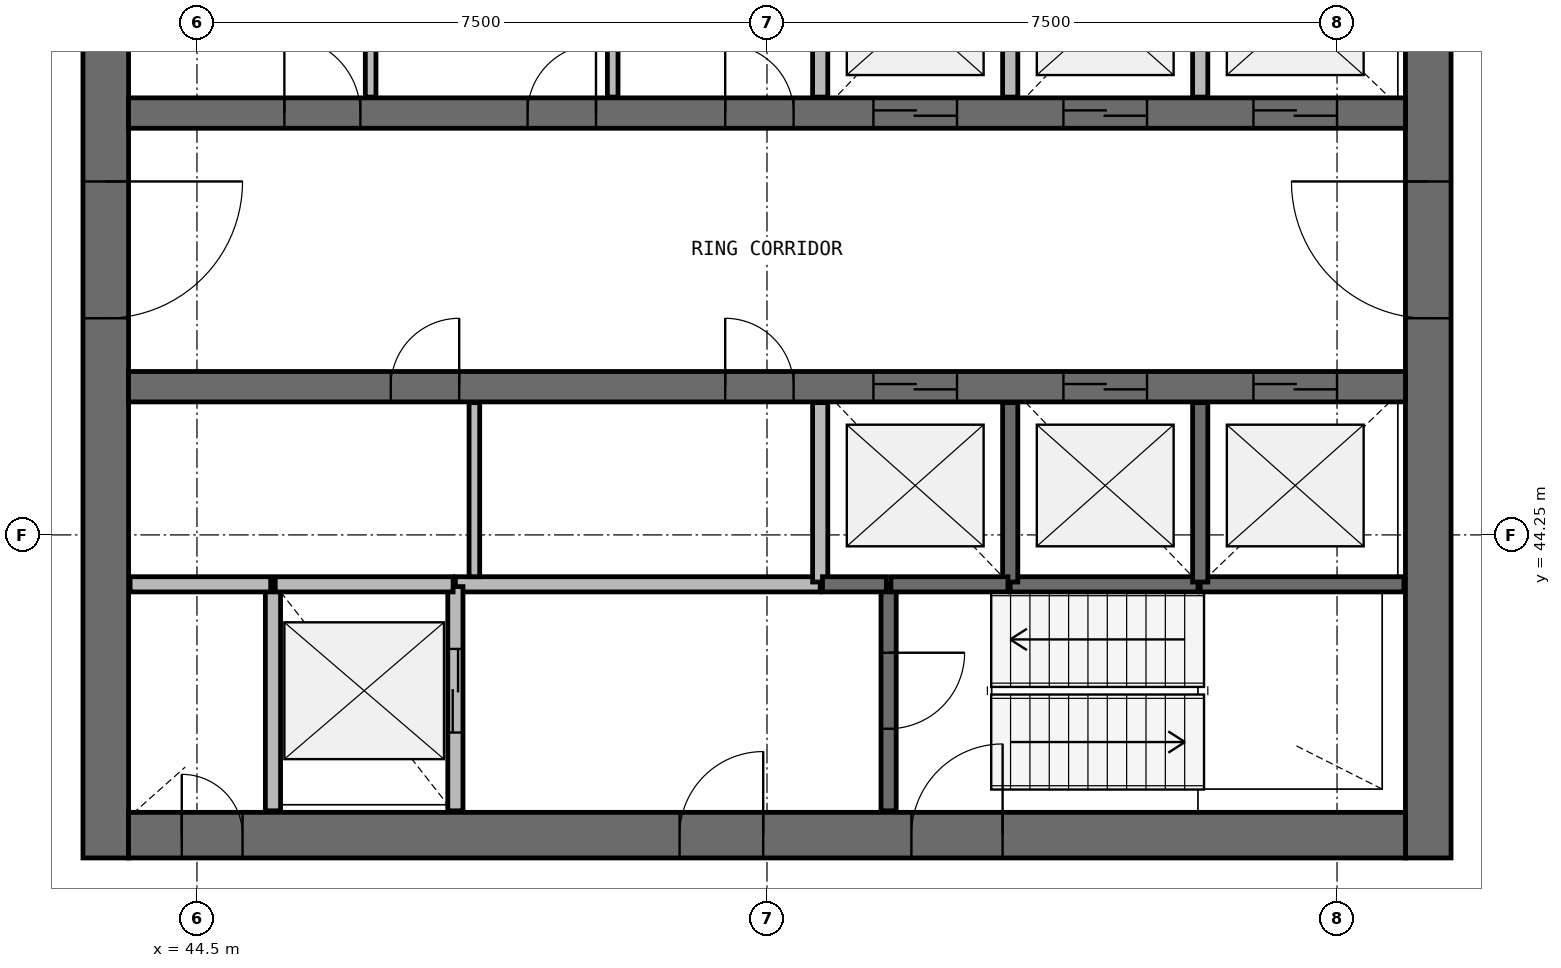
"""IFC4 building model, lengths in metres.
Left out: names, types, materials, properties, quantities, classifications, styles, units other than length and angle.
Written with IfcOpenShell. Run it as: python <this file> out.ifc"""

import sys

from ifc_helpers import new_model, si_unit, direction, frame, frame_2d, origin, place, context, subcontext, project, spatial, rectangle, extrude, source, transform, mapped, element, fill, save


model = new_model("IFC4")
c1 = context("Model", 3, precision=1e-05, world=origin(), true_north=direction((0.0, 1.0)))
c2 = subcontext(c1, "Body", "Model", "MODEL_VIEW")
j1 = project(units=[si_unit("LENGTHUNIT", "METRE"), si_unit("PLANEANGLEUNIT", "RADIAN")], contexts=[c1])
p1 = place(None, origin())
s1 = spatial("IfcSite", under=j1, at=p1, CompositionType="ELEMENT")
p2 = place(p1, origin())
s2 = spatial("IfcBuilding", under=s1, at=p2, CompositionType="ELEMENT")
p3 = place(p2, frame((0.0, 0.0, 238.4)))
s3 = spatial("IfcBuildingStorey", under=s2, at=p3, CompositionType="ELEMENT", Elevation=238.4)
p4 = place(p3, frame((60.7, 40.0, 0.0), z_axis=(0.0, 0.0, 1.0), x_axis=(0.0, 1.0, 0.0)))
e1 = element("IfcWall", 1, at=p4, inside=s3, PredefinedType="SHEAR", context=c2, shape_type="SweptSolid", body=[
    extrude(rectangle(XDim=16.0, YDim=0.6, at=frame_2d((8.0, 0.0))), origin(), (0.0, 0.0, 1.0), 3.9),
])
p5 = place(p4, frame((7.1, 0.0, 0.0)))
e2 = element("IfcOpeningElement", 2, at=p5, cuts=e1, PredefinedType="OPENING", context=c2, shape_type="SweptSolid", body=[
    extrude(rectangle(XDim=1.8, YDim=2.1, at=frame_2d((0.9, 1.05))), frame((0.0, 0.31, 0.0), z_axis=(0.0, -1.0, 0.0), x_axis=(1.0, 0.0, 0.0)), (0.0, 0.0, 1.0), 0.62),
])
p6 = place(p3, frame((43.3, 56.0, 0.0), z_axis=(0.0, 0.0, 1.0), x_axis=(0.0, -1.0, 0.0)))
e3 = element("IfcWall", 3, at=p6, inside=s3, PredefinedType="SHEAR", context=c2, shape_type="SweptSolid", body=[
    extrude(rectangle(XDim=16.0, YDim=0.6, at=frame_2d((8.0, 0.0))), origin(), (0.0, 0.0, 1.0), 3.9),
])
p7 = place(p6, frame((7.1, 0.0, 0.0)))
e4 = element("IfcOpeningElement", 4, at=p7, cuts=e3, PredefinedType="OPENING", context=c2, shape_type="SweptSolid", body=[
    extrude(rectangle(XDim=1.8, YDim=2.1, at=frame_2d((0.9, 1.05))), frame((0.0, 0.31, 0.0), z_axis=(0.0, -1.0, 0.0), x_axis=(1.0, 0.0, 0.0)), (0.0, 0.0, 1.0), 0.62),
])
p8 = place(p3, frame((43.6, 40.3, 0.0), z_axis=(0.0, 0.0, 1.0), x_axis=(1.0, 0.0, 0.0)))
e5 = element("IfcWall", 5, at=p8, inside=s3, PredefinedType="SHEAR", context=c2, shape_type="SweptSolid", body=[
    extrude(rectangle(XDim=16.8, YDim=0.6, at=frame_2d((8.4, 0.0))), origin(), (0.0, 0.0, 1.0), 3.9),
])
p9 = place(p8, frame((10.3, 0.0, 0.0)))
e6 = element("IfcOpeningElement", 6, at=p9, cuts=e5, PredefinedType="OPENING", context=c2, shape_type="SweptSolid", body=[
    extrude(rectangle(XDim=1.2, YDim=2.1, at=frame_2d((0.6, 1.05))), frame((0.0, 0.31, 0.0), z_axis=(0.0, -1.0, 0.0), x_axis=(1.0, 0.0, 0.0)), (0.0, 0.0, 1.0), 0.62),
])
p10 = place(p8, frame((7.25, 0.0, 0.0)))
e7 = element("IfcOpeningElement", 7, at=p10, cuts=e5, PredefinedType="OPENING", context=c2, shape_type="SweptSolid", body=[
    extrude(rectangle(XDim=1.1, YDim=2.1, at=frame_2d((0.55, 1.05))), frame((0.0, 0.31, 0.0), z_axis=(0.0, -1.0, 0.0), x_axis=(1.0, 0.0, 0.0)), (0.0, 0.0, 1.0), 0.62),
])
p11 = place(p8, frame((0.7, 0.0, 0.0)))
e8 = element("IfcOpeningElement", 8, at=p11, cuts=e5, PredefinedType="OPENING", context=c2, shape_type="SweptSolid", body=[
    extrude(rectangle(XDim=0.8, YDim=2.1, at=frame_2d((0.4, 1.05))), frame((0.0, 0.31, 0.0), z_axis=(0.0, -1.0, 0.0), x_axis=(1.0, 0.0, 0.0)), (0.0, 0.0, 1.0), 0.62),
])
p12 = place(p3, frame((43.6, 49.8, 0.0), z_axis=(0.0, 0.0, 1.0), x_axis=(1.0, 0.0, 0.0)))
e9 = element("IfcWall", 9, at=p12, inside=s3, PredefinedType="SHEAR", context=c2, shape_type="SweptSolid", body=[
    extrude(rectangle(XDim=16.8, YDim=0.4, at=frame_2d((8.4, 0.0))), origin(), (0.0, 0.0, 1.0), 3.9),
])
p13 = place(p12, frame((9.8, 0.0, 0.0)))
e10 = element("IfcOpeningElement", 10, at=p13, cuts=e9, PredefinedType="OPENING", context=c2, shape_type="SweptSolid", body=[
    extrude(rectangle(XDim=1.1, YDim=2.1, at=frame_2d((0.55, 1.05))), frame((0.0, 0.21, 0.0), z_axis=(0.0, -1.0, 0.0), x_axis=(1.0, 0.0, 0.0)), (0.0, 0.0, 1.0), 0.42),
])
p14 = place(p12, frame((12.3, 0.0, 0.0)))
e11 = element("IfcOpeningElement", 11, at=p14, cuts=e9, PredefinedType="OPENING", context=c2, shape_type="SweptSolid", body=[
    extrude(rectangle(XDim=1.1, YDim=2.1, at=frame_2d((0.55, 1.05))), frame((0.0, 0.21, 0.0), z_axis=(0.0, -1.0, 0.0), x_axis=(1.0, 0.0, 0.0)), (0.0, 0.0, 1.0), 0.42),
])
p15 = place(p12, frame((14.8, 0.0, 0.0)))
e12 = element("IfcOpeningElement", 12, at=p15, cuts=e9, PredefinedType="OPENING", context=c2, shape_type="SweptSolid", body=[
    extrude(rectangle(XDim=1.1, YDim=2.1, at=frame_2d((0.55, 1.05))), frame((0.0, 0.21, 0.0), z_axis=(0.0, -1.0, 0.0), x_axis=(1.0, 0.0, 0.0)), (0.0, 0.0, 1.0), 0.42),
])
p16 = place(p12, frame((2.05, 0.0, 0.0)))
e13 = element("IfcOpeningElement", 13, at=p16, cuts=e9, PredefinedType="OPENING", context=c2, shape_type="SweptSolid", body=[
    extrude(rectangle(XDim=1.0, YDim=2.1, at=frame_2d((0.5, 1.05))), frame((0.0, 0.21, 0.0), z_axis=(0.0, -1.0, 0.0), x_axis=(1.0, 0.0, 0.0)), (0.0, 0.0, 1.0), 0.42),
])
p17 = place(p12, frame((5.25, 0.0, 0.0)))
e14 = element("IfcOpeningElement", 14, at=p17, cuts=e9, PredefinedType="OPENING", context=c2, shape_type="SweptSolid", body=[
    extrude(rectangle(XDim=0.9, YDim=2.1, at=frame_2d((0.45, 1.05))), frame((0.0, 0.21, 0.0), z_axis=(0.0, -1.0, 0.0), x_axis=(1.0, 0.0, 0.0)), (0.0, 0.0, 1.0), 0.42),
])
p18 = place(p12, frame((7.85, 0.0, 0.0)))
e15 = element("IfcOpeningElement", 15, at=p18, cuts=e9, PredefinedType="OPENING", context=c2, shape_type="SweptSolid", body=[
    extrude(rectangle(XDim=0.9, YDim=2.1, at=frame_2d((0.45, 1.05))), frame((0.0, 0.21, 0.0), z_axis=(0.0, -1.0, 0.0), x_axis=(1.0, 0.0, 0.0)), (0.0, 0.0, 1.0), 0.42),
])
p19 = place(p3, frame((43.6, 46.2, 0.0), z_axis=(0.0, 0.0, 1.0), x_axis=(1.0, 0.0, 0.0)))
e16 = element("IfcWall", 16, at=p19, inside=s3, PredefinedType="SHEAR", context=c2, shape_type="SweptSolid", body=[
    extrude(rectangle(XDim=16.8, YDim=0.4, at=frame_2d((8.4, 0.0))), origin(), (0.0, 0.0, 1.0), 3.9),
])
p20 = place(p19, frame((9.8, 0.0, 0.0)))
e17 = element("IfcOpeningElement", 17, at=p20, cuts=e16, PredefinedType="OPENING", context=c2, shape_type="SweptSolid", body=[
    extrude(rectangle(XDim=1.1, YDim=2.1, at=frame_2d((0.55, 1.05))), frame((0.0, 0.21, 0.0), z_axis=(0.0, -1.0, 0.0), x_axis=(1.0, 0.0, 0.0)), (0.0, 0.0, 1.0), 0.42),
])
p21 = place(p19, frame((12.3, 0.0, 0.0)))
e18 = element("IfcOpeningElement", 18, at=p21, cuts=e16, PredefinedType="OPENING", context=c2, shape_type="SweptSolid", body=[
    extrude(rectangle(XDim=1.1, YDim=2.1, at=frame_2d((0.55, 1.05))), frame((0.0, 0.21, 0.0), z_axis=(0.0, -1.0, 0.0), x_axis=(1.0, 0.0, 0.0)), (0.0, 0.0, 1.0), 0.42),
])
p22 = place(p19, frame((14.8, 0.0, 0.0)))
e19 = element("IfcOpeningElement", 19, at=p22, cuts=e16, PredefinedType="OPENING", context=c2, shape_type="SweptSolid", body=[
    extrude(rectangle(XDim=1.1, YDim=2.1, at=frame_2d((0.55, 1.05))), frame((0.0, 0.21, 0.0), z_axis=(0.0, -1.0, 0.0), x_axis=(1.0, 0.0, 0.0)), (0.0, 0.0, 1.0), 0.42),
])
p23 = place(p19, frame((3.45, 0.0, 0.0)))
e20 = element("IfcOpeningElement", 20, at=p23, cuts=e16, PredefinedType="OPENING", context=c2, shape_type="SweptSolid", body=[
    extrude(rectangle(XDim=0.9, YDim=2.1, at=frame_2d((0.45, 1.05))), frame((0.0, 0.21, 0.0), z_axis=(0.0, -1.0, 0.0), x_axis=(1.0, 0.0, 0.0)), (0.0, 0.0, 1.0), 0.42),
])
p24 = place(p19, frame((7.85, 0.0, 0.0)))
e21 = element("IfcOpeningElement", 21, at=p24, cuts=e16, PredefinedType="OPENING", context=c2, shape_type="SweptSolid", body=[
    extrude(rectangle(XDim=0.9, YDim=2.1, at=frame_2d((0.45, 1.05))), frame((0.0, 0.21, 0.0), z_axis=(0.0, -1.0, 0.0), x_axis=(1.0, 0.0, 0.0)), (0.0, 0.0, 1.0), 0.42),
])
p25 = place(p3, frame((52.7, 43.6, 0.0), z_axis=(0.0, 0.0, 1.0), x_axis=(-1.0, 0.0, 0.0)))
e22 = element("IfcWall", 22, at=p25, inside=s3, PredefinedType="SOLIDWALL", context=c2, shape_type="SweptSolid", body=[
    extrude(rectangle(XDim=4.8, YDim=0.2, at=frame_2d((2.4, 0.0))), origin(), (0.0, 0.0, 1.0), 3.58),
])
p26 = place(p3, frame((45.5, 43.6, 0.0), z_axis=(0.0, 0.0, 1.0), x_axis=(0.0, -1.0, 0.0)))
e23 = element("IfcWall", 23, at=p26, inside=s3, PredefinedType="SOLIDWALL", context=c2, shape_type="SweptSolid", body=[
    extrude(rectangle(XDim=2.98, YDim=0.2, at=frame_2d((1.49, 0.0))), origin(), (0.0, 0.0, 1.0), 3.58),
])
p27 = place(p3, frame((47.9, 40.62, 0.0), z_axis=(0.0, 0.0, 1.0), x_axis=(0.0, 1.0, 0.0)))
e24 = element("IfcWall", 24, at=p27, inside=s3, PredefinedType="SOLIDWALL", context=c2, shape_type="SweptSolid", body=[
    extrude(rectangle(XDim=2.95, YDim=0.2, at=frame_2d((1.475, 0.0))), origin(), (0.0, 0.0, 1.0), 3.58),
])
p28 = place(p27, frame((1.03, 0.0, 0.0)))
e25 = element("IfcOpeningElement", 25, at=p28, cuts=e24, PredefinedType="OPENING", context=c2, shape_type="SweptSolid", body=[
    extrude(rectangle(XDim=1.1, YDim=2.1, at=frame_2d((0.55, 1.05))), frame((0.0, 0.11, 0.0), z_axis=(0.0, -1.0, 0.0), x_axis=(1.0, 0.0, 0.0)), (0.0, 0.0, 1.0), 0.22),
])
p29 = place(p3, frame((53.6, 43.6, 0.0), z_axis=(0.0, 0.0, 1.0), x_axis=(0.0, -1.0, 0.0)))
e26 = element("IfcWall", 26, at=p29, inside=s3, PredefinedType="SOLIDWALL", context=c2, shape_type="SweptSolid", body=[
    extrude(rectangle(XDim=2.98, YDim=0.2, at=frame_2d((1.49, 0.0))), origin(), (0.0, 0.0, 1.0), 3.58),
])
p30 = place(p29, frame((0.9, 0.0, 0.0)))
e27 = element("IfcOpeningElement", 27, at=p30, cuts=e26, PredefinedType="OPENING", context=c2, shape_type="SweptSolid", body=[
    extrude(rectangle(XDim=1.0, YDim=2.1, at=frame_2d((0.5, 1.05))), frame((0.0, 0.11, 0.0), z_axis=(0.0, -1.0, 0.0), x_axis=(1.0, 0.0, 0.0)), (0.0, 0.0, 1.0), 0.22),
])
p31 = place(p3, frame((57.7, 43.6, 0.0), z_axis=(0.0, 0.0, 1.0), x_axis=(1.0, 0.0, 0.0)))
e28 = element("IfcWall", 28, at=p31, inside=s3, PredefinedType="SOLIDWALL", context=c2, shape_type="SweptSolid", body=[
    extrude(rectangle(XDim=2.68, YDim=0.2, at=frame_2d((1.34, 0.0))), origin(), (0.0, 0.0, 1.0), 3.58),
])
p32 = place(p3, frame((55.2, 43.6, 0.0), z_axis=(0.0, 0.0, 1.0), x_axis=(1.0, 0.0, 0.0)))
e29 = element("IfcWall", 29, at=p32, inside=s3, PredefinedType="SOLIDWALL", context=c2, shape_type="SweptSolid", body=[
    extrude(rectangle(XDim=2.47, YDim=0.2, at=frame_2d((1.235, 0.0))), origin(), (0.0, 0.0, 1.0), 3.58),
])
p33 = place(p3, frame((47.87, 43.6, 0.0), z_axis=(0.0, 0.0, 1.0), x_axis=(-1.0, 0.0, 0.0)))
e30 = element("IfcWall", 30, at=p33, inside=s3, PredefinedType="SOLIDWALL", context=c2, shape_type="SweptSolid", body=[
    extrude(rectangle(XDim=2.34, YDim=0.2, at=frame_2d((1.17, 0.0))), origin(), (0.0, 0.0, 1.0), 3.58),
])
for number, where, z_axis, x_axis in (
    (31, (52.7, 45.99, 0.0), (0.0, 0.0, 1.0), (0.0, -1.0, 0.0)),
    (32, (52.7, 52.37, 0.0), (0.0, 0.0, 1.0), (0.0, -1.0, 0.0)),
    (33, (55.2, 43.63, 0.0), (0.0, 0.0, 1.0), (0.0, 1.0, 0.0)),
    (34, (55.2, 50.01, 0.0), (0.0, 0.0, 1.0), (0.0, 1.0, 0.0)),
    (35, (57.7, 43.63, 0.0), (0.0, 0.0, 1.0), (0.0, 1.0, 0.0)),
):
    element("IfcWall", number, at=place(p3, frame(where, z_axis=z_axis, x_axis=x_axis)), inside=s3, PredefinedType="SOLIDWALL", context=c2, shape_type="SweptSolid", body=[
        extrude(rectangle(XDim=2.36, YDim=0.2, at=frame_2d((1.18, 0.0))), origin(), (0.0, 0.0, 1.0), 3.58),
    ])
p34 = place(p3, frame((57.7, 50.01, 0.0), z_axis=(0.0, 0.0, 1.0), x_axis=(0.0, 1.0, 0.0)))
e36 = element("IfcWall", 36, at=p34, inside=s3, PredefinedType="SOLIDWALL", context=c2, shape_type="SweptSolid", body=[
    extrude(rectangle(XDim=2.39, YDim=0.2, at=frame_2d((1.195, 0.0))), origin(), (0.0, 0.0, 1.0), 3.58),
])
p35 = place(p3, frame((45.47, 43.6, 0.0), z_axis=(0.0, 0.0, 1.0), x_axis=(-1.0, 0.0, 0.0)))
e37 = element("IfcWall", 37, at=p35, inside=s3, PredefinedType="SOLIDWALL", context=c2, shape_type="SweptSolid", body=[
    extrude(rectangle(XDim=1.85, YDim=0.2, at=frame_2d((0.925, 0.0))), origin(), (0.0, 0.0, 1.0), 3.58),
])
p36 = place(p3, frame((53.63, 43.6, 0.0), z_axis=(0.0, 0.0, 1.0), x_axis=(1.0, 0.0, 0.0)))
e38 = element("IfcWall", 38, at=p36, inside=s3, PredefinedType="SOLIDWALL", context=c2, shape_type="SweptSolid", body=[
    extrude(rectangle(XDim=1.54, YDim=0.2, at=frame_2d((0.77, 0.0))), origin(), (0.0, 0.0, 1.0), 3.58),
])
p37 = place(p3, frame((52.73, 43.6, 0.0), z_axis=(0.0, 0.0, 1.0), x_axis=(1.0, 0.0, 0.0)))
e39 = element("IfcWall", 39, at=p37, inside=s3, PredefinedType="SOLIDWALL", context=c2, shape_type="SweptSolid", body=[
    extrude(rectangle(XDim=0.84, YDim=0.2, at=frame_2d((0.42, 0.0))), origin(), (0.0, 0.0, 1.0), 3.58),
])
for number, where, z_axis, x_axis in (
    (40, (46.785, 50.01, 0.0), (0.0, 0.0, 1.0), (0.0, 1.0, 0.0)),
    (41, (48.15, 43.7, 0.0), (0.0, 0.0, 1.0), (0.0, 1.0, 0.0)),
    (42, (49.97, 50.01, 0.0), (0.0, 0.0, 1.0), (0.0, 1.0, 0.0)),
):
    element("IfcWall", number, at=place(p3, frame(where, z_axis=z_axis, x_axis=x_axis)), inside=s3, PredefinedType="PARTITIONING", context=c2, shape_type="SweptSolid", body=[
        extrude(rectangle(XDim=2.29, YDim=0.14, at=frame_2d((1.145, 0.0))), origin(), (0.0, 0.0, 1.0), 2.88),
    ])
m1 = source(origin(), c2, "Body", "SweptSolid", [
    extrude(rectangle(XDim=1.8, YDim=2.1, at=frame_2d((0.9, 1.05))), frame((0.0, 0.025, 0.0), z_axis=(0.0, -1.0, 0.0), x_axis=(1.0, 0.0, 0.0)), (0.0, 0.0, 1.0), 0.05),
])
p38 = place(p7, origin())
e43 = element("IfcDoor", 43, at=p38, inside=s3, OperationType="SINGLE_SWING_LEFT", PredefinedType="DOOR", context=c2, shape_type="MappedRepresentation", body=[
    mapped(m1, transform((0.0, 0.0, 0.0), scale=1.0)),
])
fill(e4, e43)
p39 = place(p5, origin())
e44 = element("IfcDoor", 44, at=p39, inside=s3, OperationType="SINGLE_SWING_RIGHT", PredefinedType="DOOR", context=c2, shape_type="MappedRepresentation", body=[
    mapped(m1, transform((0.0, 0.0, 0.0), scale=1.0)),
])
fill(e2, e44)
m2 = source(origin(), c2, "Body", "SweptSolid", [
    extrude(rectangle(XDim=1.1, YDim=2.1, at=frame_2d((0.55, 1.05))), frame((0.0, 0.025, 0.0), z_axis=(0.0, -1.0, 0.0), x_axis=(1.0, 0.0, 0.0)), (0.0, 0.0, 1.0), 0.05),
])
p40 = place(p13, origin())
e45 = element("IfcDoor", 45, at=p40, inside=s3, OperationType="DOUBLE_DOOR_SLIDING", PredefinedType="USERDEFINED", context=c2, shape_type="MappedRepresentation", body=[
    mapped(m2, transform((0.0, 0.0, 0.0), scale=1.0)),
])
fill(e10, e45)
p41 = place(p14, origin())
e46 = element("IfcDoor", 46, at=p41, inside=s3, OperationType="DOUBLE_DOOR_SLIDING", PredefinedType="USERDEFINED", context=c2, shape_type="MappedRepresentation", body=[
    mapped(m2, transform((0.0, 0.0, 0.0), scale=1.0)),
])
fill(e11, e46)
p42 = place(p15, origin())
e47 = element("IfcDoor", 47, at=p42, inside=s3, OperationType="DOUBLE_DOOR_SLIDING", PredefinedType="USERDEFINED", context=c2, shape_type="MappedRepresentation", body=[
    mapped(m2, transform((0.0, 0.0, 0.0), scale=1.0)),
])
fill(e12, e47)
p43 = place(p20, origin())
e48 = element("IfcDoor", 48, at=p43, inside=s3, OperationType="DOUBLE_DOOR_SLIDING", PredefinedType="USERDEFINED", context=c2, shape_type="MappedRepresentation", body=[
    mapped(m2, transform((0.0, 0.0, 0.0), scale=1.0)),
])
fill(e17, e48)
p44 = place(p21, origin())
e49 = element("IfcDoor", 49, at=p44, inside=s3, OperationType="DOUBLE_DOOR_SLIDING", PredefinedType="USERDEFINED", context=c2, shape_type="MappedRepresentation", body=[
    mapped(m2, transform((0.0, 0.0, 0.0), scale=1.0)),
])
fill(e18, e49)
p45 = place(p22, origin())
e50 = element("IfcDoor", 50, at=p45, inside=s3, OperationType="DOUBLE_DOOR_SLIDING", PredefinedType="USERDEFINED", context=c2, shape_type="MappedRepresentation", body=[
    mapped(m2, transform((0.0, 0.0, 0.0), scale=1.0)),
])
fill(e19, e50)
p46 = place(p28, origin())
e51 = element("IfcDoor", 51, at=p46, inside=s3, OperationType="DOUBLE_DOOR_SLIDING", PredefinedType="USERDEFINED", context=c2, shape_type="MappedRepresentation", body=[
    mapped(m2, transform((0.0, 0.0, 0.0), scale=1.0)),
])
fill(e25, e51)
m3 = source(origin(), c2, "Body", "SweptSolid", [
    extrude(rectangle(XDim=1.2, YDim=2.1, at=frame_2d((0.6, 1.05))), frame((0.0, 0.025, 0.0), z_axis=(0.0, -1.0, 0.0), x_axis=(1.0, 0.0, 0.0)), (0.0, 0.0, 1.0), 0.05),
])
p47 = place(p9, origin())
e52 = element("IfcDoor", 52, at=p47, inside=s3, OperationType="SINGLE_SWING_RIGHT", PredefinedType="DOOR", context=c2, shape_type="MappedRepresentation", body=[
    mapped(m3, transform((0.0, 0.0, 0.0), scale=1.0)),
])
fill(e6, e52)
m4 = source(origin(), c2, "Body", "SweptSolid", [
    extrude(rectangle(XDim=1.0, YDim=2.1, at=frame_2d((0.5, 1.05))), frame((0.0, 0.025, 0.0), z_axis=(0.0, -1.0, 0.0), x_axis=(1.0, 0.0, 0.0)), (0.0, 0.0, 1.0), 0.05),
])
p48 = place(p30, origin())
e53 = element("IfcDoor", 53, at=p48, inside=s3, OperationType="SINGLE_SWING_LEFT", PredefinedType="DOOR", context=c2, shape_type="MappedRepresentation", body=[
    mapped(m4, transform((0.0, 0.0, 0.0), scale=1.0)),
])
fill(e27, e53)
m5 = source(origin(), c2, "Body", "SweptSolid", [
    extrude(rectangle(XDim=1.1, YDim=2.1, at=frame_2d((0.55, 1.05))), frame((0.0, 0.025, 0.0), z_axis=(0.0, -1.0, 0.0), x_axis=(1.0, 0.0, 0.0)), (0.0, 0.0, 1.0), 0.05),
])
p49 = place(p10, origin())
e54 = element("IfcDoor", 54, at=p49, inside=s3, OperationType="SINGLE_SWING_RIGHT", PredefinedType="DOOR", context=c2, shape_type="MappedRepresentation", body=[
    mapped(m5, transform((0.0, 0.0, 0.0), scale=1.0)),
])
fill(e7, e54)
m6 = source(origin(), c2, "Body", "SweptSolid", [
    extrude(rectangle(XDim=0.8, YDim=2.1, at=frame_2d((0.4, 1.05))), frame((0.0, 0.025, 0.0), z_axis=(0.0, -1.0, 0.0), x_axis=(1.0, 0.0, 0.0)), (0.0, 0.0, 1.0), 0.05),
])
p50 = place(p11, origin())
e55 = element("IfcDoor", 55, at=p50, inside=s3, OperationType="SINGLE_SWING_LEFT", PredefinedType="DOOR", context=c2, shape_type="MappedRepresentation", body=[
    mapped(m6, transform((0.0, 0.0, 0.0), scale=1.0)),
])
fill(e8, e55)
m7 = source(origin(), c2, "Body", "SweptSolid", [
    extrude(rectangle(XDim=1.0, YDim=2.1, at=frame_2d((0.5, 1.05))), frame((0.0, 0.025, 0.0), z_axis=(0.0, -1.0, 0.0), x_axis=(1.0, 0.0, 0.0)), (0.0, 0.0, 1.0), 0.05),
])
p51 = place(p16, origin())
e56 = element("IfcDoor", 56, at=p51, inside=s3, OperationType="SINGLE_SWING_LEFT", PredefinedType="DOOR", context=c2, shape_type="MappedRepresentation", body=[
    mapped(m7, transform((0.0, 0.0, 0.0), scale=1.0)),
])
fill(e13, e56)
m8 = source(origin(), c2, "Body", "SweptSolid", [
    extrude(rectangle(XDim=0.9, YDim=2.1, at=frame_2d((0.45, 1.05))), frame((0.0, 0.025, 0.0), z_axis=(0.0, -1.0, 0.0), x_axis=(1.0, 0.0, 0.0)), (0.0, 0.0, 1.0), 0.05),
])
p52 = place(p17, origin())
e57 = element("IfcDoor", 57, at=p52, inside=s3, OperationType="SINGLE_SWING_RIGHT", PredefinedType="DOOR", context=c2, shape_type="MappedRepresentation", body=[
    mapped(m8, transform((0.0, 0.0, 0.0), scale=1.0)),
])
fill(e14, e57)
p53 = place(p18, origin())
e58 = element("IfcDoor", 58, at=p53, inside=s3, OperationType="SINGLE_SWING_LEFT", PredefinedType="DOOR", context=c2, shape_type="MappedRepresentation", body=[
    mapped(m8, transform((0.0, 0.0, 0.0), scale=1.0)),
])
fill(e15, e58)
p54 = place(p23, origin())
e59 = element("IfcDoor", 59, at=p54, inside=s3, OperationType="SINGLE_SWING_RIGHT", PredefinedType="DOOR", context=c2, shape_type="MappedRepresentation", body=[
    mapped(m8, transform((0.0, 0.0, 0.0), scale=1.0)),
])
fill(e20, e59)
p55 = place(p24, origin())
e60 = element("IfcDoor", 60, at=p55, inside=s3, OperationType="SINGLE_SWING_LEFT", PredefinedType="DOOR", context=c2, shape_type="MappedRepresentation", body=[
    mapped(m8, transform((0.0, 0.0, 0.0), scale=1.0)),
])
fill(e21, e60)
save(model, sys.argv[1])
